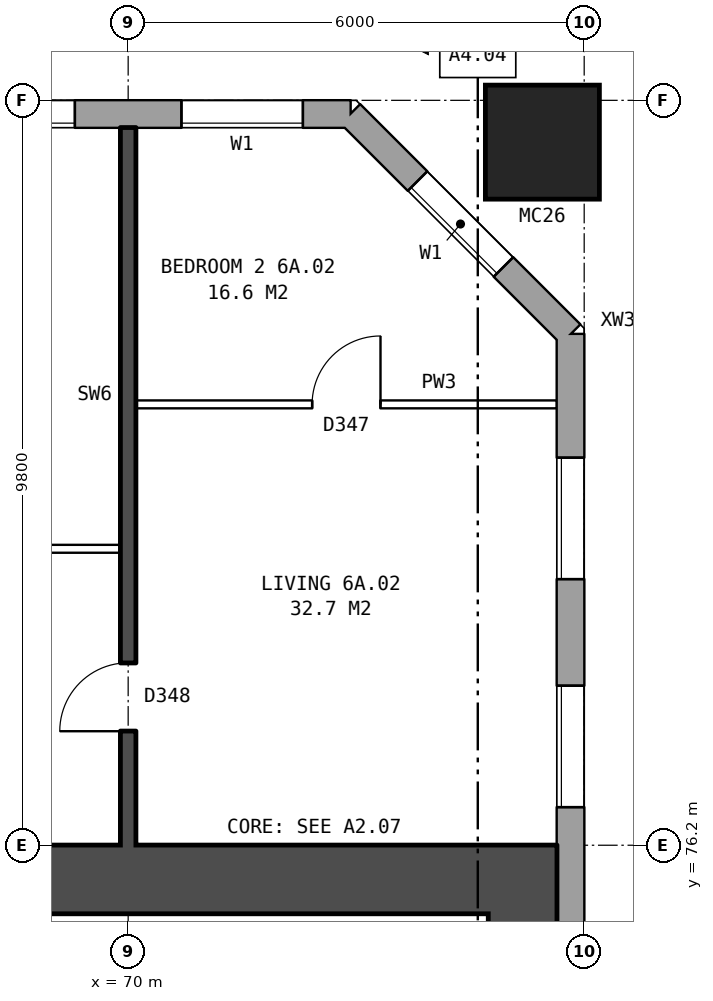
"""IFC4 building model, lengths in metres.
Left out: names, types, materials, properties, quantities, classifications, styles, units other than length and angle.
Written with IfcOpenShell. Run it as: python <this file> out.ifc"""

import sys

from ifc_helpers import new_model, si_unit, direction, frame, frame_2d, origin, origin_2d, place, context, subcontext, project, spatial, rectangle, hollow_rectangle, extrude, element, fill, save


model = new_model("IFC4")
c1 = context("Model", 3, precision=1e-05, world=origin(), true_north=direction((0.0, 1.0)))
c2 = subcontext(c1, "Body", "Model", "MODEL_VIEW")
j1 = project(units=[si_unit("LENGTHUNIT", "METRE"), si_unit("PLANEANGLEUNIT", "RADIAN")], contexts=[c1])
p1 = place(None, origin())
s1 = spatial("IfcSite", under=j1, at=p1, CompositionType="ELEMENT")
p2 = place(p1, origin())
s2 = spatial("IfcBuilding", under=s1, at=p2, CompositionType="ELEMENT")
p3 = place(p2, frame((0.0, 0.0, 25.7)))
s3 = spatial("IfcBuildingStorey", under=s2, at=p3, CompositionType="ELEMENT", Elevation=25.7)
p4 = place(p3, frame((75.45, 85.45, 0.0), z_axis=(0.0, 0.0, 1.0), x_axis=(1.0, 0.0, 0.0)))
e1 = element("IfcColumn", 1, at=p4, inside=s3, PredefinedType="COLUMN", context=c2, shape_type="SweptSolid", body=[
    extrude(hollow_rectangle(XDim=1.5, YDim=1.5, WallThickness=0.08, at=origin_2d()), origin(), (0.0, 0.0, 1.0), 3.1),
])
p5 = place(p3, frame((75.82, 57.075, 0.0), z_axis=(0.0, 0.0, 1.0), x_axis=(0.0, 1.0, 0.0)))
e2 = element("IfcWall", 2, at=p5, inside=s3, PredefinedType="STANDARD", context=c2, shape_type="SweptSolid", body=[
    extrude(rectangle(XDim=25.851, YDim=0.36, at=frame_2d((12.925, 0.0))), origin(), (0.0, 0.0, 1.0), 2.85),
])
p6 = place(p5, frame((1.625, 0.0, 0.8)))
e3 = element("IfcOpeningElement", 3, at=p6, cuts=e2, PredefinedType="OPENING", context=c2, shape_type="SweptSolid", body=[
    extrude(rectangle(XDim=1.6, YDim=1.8, at=frame_2d((0.8, 0.9))), frame((0.0, 0.19, 0.0), z_axis=(0.0, -1.0, 0.0), x_axis=(1.0, 0.0, 0.0)), (0.0, 0.0, 1.0), 0.38),
])
p7 = place(p5, frame((4.625, 0.0, 0.8)))
e4 = element("IfcOpeningElement", 4, at=p7, cuts=e2, PredefinedType="OPENING", context=c2, shape_type="SweptSolid", body=[
    extrude(rectangle(XDim=1.6, YDim=1.8, at=frame_2d((0.8, 0.9))), frame((0.0, 0.19, 0.0), z_axis=(0.0, -1.0, 0.0), x_axis=(1.0, 0.0, 0.0)), (0.0, 0.0, 1.0), 0.38),
])
p8 = place(p5, frame((19.625, 0.0, 0.8)))
e5 = element("IfcOpeningElement", 5, at=p8, cuts=e2, PredefinedType="OPENING", context=c2, shape_type="SweptSolid", body=[
    extrude(rectangle(XDim=1.6, YDim=1.8, at=frame_2d((0.8, 0.9))), frame((0.0, 0.19, 0.0), z_axis=(0.0, -1.0, 0.0), x_axis=(1.0, 0.0, 0.0)), (0.0, 0.0, 1.0), 0.38),
])
p9 = place(p5, frame((22.625, 0.0, 0.8)))
e6 = element("IfcOpeningElement", 6, at=p9, cuts=e2, PredefinedType="OPENING", context=c2, shape_type="SweptSolid", body=[
    extrude(rectangle(XDim=1.6, YDim=1.8, at=frame_2d((0.8, 0.9))), frame((0.0, 0.19, 0.0), z_axis=(0.0, -1.0, 0.0), x_axis=(1.0, 0.0, 0.0)), (0.0, 0.0, 1.0), 0.38),
])
p10 = place(p3, frame((75.82, 82.925, 0.0), z_axis=(0.0, 0.0, 1.0), x_axis=(-0.707106781187, 0.707106781187, 0.0)))
e7 = element("IfcWall", 7, at=p10, inside=s3, PredefinedType="STANDARD", context=c2, shape_type="SweptSolid", body=[
    extrude(rectangle(XDim=4.094, YDim=0.36, at=frame_2d((2.047, 0.0))), origin(), (0.0, 0.0, 1.0), 2.85),
])
p11 = place(p10, frame((1.247, 0.0, 0.8)))
e8 = element("IfcOpeningElement", 8, at=p11, cuts=e7, PredefinedType="OPENING", context=c2, shape_type="SweptSolid", body=[
    extrude(rectangle(XDim=1.6, YDim=1.8, at=frame_2d((0.8, 0.9))), frame((0.0, 0.19, 0.0), z_axis=(0.0, -1.0, 0.0), x_axis=(1.0, 0.0, 0.0)), (0.0, 0.0, 1.0), 0.38),
])
p12 = place(p3, frame((72.925, 85.82, 0.0), z_axis=(0.0, 0.0, 1.0), x_axis=(-1.0, 0.0, 0.0)))
e9 = element("IfcWall", 9, at=p12, inside=s3, PredefinedType="STANDARD", context=c2, shape_type="SweptSolid", body=[
    extrude(rectangle(XDim=50.101, YDim=0.36, at=frame_2d((25.05, 0.0))), origin(), (0.0, 0.0, 1.0), 2.85),
])
p13 = place(p12, frame((0.625, 0.0, 0.8)))
e10 = element("IfcOpeningElement", 10, at=p13, cuts=e9, PredefinedType="OPENING", context=c2, shape_type="SweptSolid", body=[
    extrude(rectangle(XDim=1.6, YDim=1.8, at=frame_2d((0.8, 0.9))), frame((0.0, 0.19, 0.0), z_axis=(0.0, -1.0, 0.0), x_axis=(1.0, 0.0, 0.0)), (0.0, 0.0, 1.0), 0.38),
])
p14 = place(p12, frame((3.625, 0.0, 0.8)))
e11 = element("IfcOpeningElement", 11, at=p14, cuts=e9, PredefinedType="OPENING", context=c2, shape_type="SweptSolid", body=[
    extrude(rectangle(XDim=1.6, YDim=1.8, at=frame_2d((0.8, 0.9))), frame((0.0, 0.19, 0.0), z_axis=(0.0, -1.0, 0.0), x_axis=(1.0, 0.0, 0.0)), (0.0, 0.0, 1.0), 0.38),
])
p15 = place(p12, frame((5.525, 0.0, 0.8)))
e12 = element("IfcOpeningElement", 12, at=p15, cuts=e9, PredefinedType="OPENING", context=c2, shape_type="SweptSolid", body=[
    extrude(rectangle(XDim=1.4, YDim=1.8, at=frame_2d((0.7, 0.9))), frame((0.0, 0.19, 0.0), z_axis=(0.0, -1.0, 0.0), x_axis=(1.0, 0.0, 0.0)), (0.0, 0.0, 1.0), 0.38),
])
p16 = place(p12, frame((9.175, 0.0, 0.15)))
e13 = element("IfcOpeningElement", 13, at=p16, cuts=e9, PredefinedType="OPENING", context=c2, shape_type="SweptSolid", body=[
    extrude(rectangle(XDim=1.0, YDim=0.9, at=frame_2d((0.5, 0.45))), frame((0.0, 0.19, 0.0), z_axis=(0.0, -1.0, 0.0), x_axis=(1.0, 0.0, 0.0)), (0.0, 0.0, 1.0), 0.38),
])
p17 = place(p12, frame((12.625, 0.0, 0.8)))
e14 = element("IfcOpeningElement", 14, at=p17, cuts=e9, PredefinedType="OPENING", context=c2, shape_type="SweptSolid", body=[
    extrude(rectangle(XDim=1.6, YDim=1.8, at=frame_2d((0.8, 0.9))), frame((0.0, 0.19, 0.0), z_axis=(0.0, -1.0, 0.0), x_axis=(1.0, 0.0, 0.0)), (0.0, 0.0, 1.0), 0.38),
])
p18 = place(p12, frame((15.625, 0.0, 0.8)))
e15 = element("IfcOpeningElement", 15, at=p18, cuts=e9, PredefinedType="OPENING", context=c2, shape_type="SweptSolid", body=[
    extrude(rectangle(XDim=1.6, YDim=1.8, at=frame_2d((0.8, 0.9))), frame((0.0, 0.19, 0.0), z_axis=(0.0, -1.0, 0.0), x_axis=(1.0, 0.0, 0.0)), (0.0, 0.0, 1.0), 0.38),
])
p19 = place(p12, frame((18.625, 0.0, 0.8)))
e16 = element("IfcOpeningElement", 16, at=p19, cuts=e9, PredefinedType="OPENING", context=c2, shape_type="SweptSolid", body=[
    extrude(rectangle(XDim=1.6, YDim=1.8, at=frame_2d((0.8, 0.9))), frame((0.0, 0.19, 0.0), z_axis=(0.0, -1.0, 0.0), x_axis=(1.0, 0.0, 0.0)), (0.0, 0.0, 1.0), 0.38),
])
p20 = place(p12, frame((21.625, 0.0, 0.8)))
e17 = element("IfcOpeningElement", 17, at=p20, cuts=e9, PredefinedType="OPENING", context=c2, shape_type="SweptSolid", body=[
    extrude(rectangle(XDim=1.6, YDim=1.8, at=frame_2d((0.8, 0.9))), frame((0.0, 0.19, 0.0), z_axis=(0.0, -1.0, 0.0), x_axis=(1.0, 0.0, 0.0)), (0.0, 0.0, 1.0), 0.38),
])
p21 = place(p12, frame((24.625, 0.0, 0.8)))
e18 = element("IfcOpeningElement", 18, at=p21, cuts=e9, PredefinedType="OPENING", context=c2, shape_type="SweptSolid", body=[
    extrude(rectangle(XDim=1.6, YDim=1.8, at=frame_2d((0.8, 0.9))), frame((0.0, 0.19, 0.0), z_axis=(0.0, -1.0, 0.0), x_axis=(1.0, 0.0, 0.0)), (0.0, 0.0, 1.0), 0.38),
])
p22 = place(p12, frame((27.625, 0.0, 0.8)))
e19 = element("IfcOpeningElement", 19, at=p22, cuts=e9, PredefinedType="OPENING", context=c2, shape_type="SweptSolid", body=[
    extrude(rectangle(XDim=1.6, YDim=1.8, at=frame_2d((0.8, 0.9))), frame((0.0, 0.19, 0.0), z_axis=(0.0, -1.0, 0.0), x_axis=(1.0, 0.0, 0.0)), (0.0, 0.0, 1.0), 0.38),
])
p23 = place(p12, frame((30.625, 0.0, 0.8)))
e20 = element("IfcOpeningElement", 20, at=p23, cuts=e9, PredefinedType="OPENING", context=c2, shape_type="SweptSolid", body=[
    extrude(rectangle(XDim=1.6, YDim=1.8, at=frame_2d((0.8, 0.9))), frame((0.0, 0.19, 0.0), z_axis=(0.0, -1.0, 0.0), x_axis=(1.0, 0.0, 0.0)), (0.0, 0.0, 1.0), 0.38),
])
p24 = place(p12, frame((33.625, 0.0, 0.8)))
e21 = element("IfcOpeningElement", 21, at=p24, cuts=e9, PredefinedType="OPENING", context=c2, shape_type="SweptSolid", body=[
    extrude(rectangle(XDim=1.6, YDim=1.8, at=frame_2d((0.8, 0.9))), frame((0.0, 0.19, 0.0), z_axis=(0.0, -1.0, 0.0), x_axis=(1.0, 0.0, 0.0)), (0.0, 0.0, 1.0), 0.38),
])
p25 = place(p12, frame((36.625, 0.0, 0.8)))
e22 = element("IfcOpeningElement", 22, at=p25, cuts=e9, PredefinedType="OPENING", context=c2, shape_type="SweptSolid", body=[
    extrude(rectangle(XDim=1.6, YDim=1.8, at=frame_2d((0.8, 0.9))), frame((0.0, 0.19, 0.0), z_axis=(0.0, -1.0, 0.0), x_axis=(1.0, 0.0, 0.0)), (0.0, 0.0, 1.0), 0.38),
])
p26 = place(p12, frame((39.125, 0.0, 0.8)))
e23 = element("IfcOpeningElement", 23, at=p26, cuts=e9, PredefinedType="OPENING", context=c2, shape_type="SweptSolid", body=[
    extrude(rectangle(XDim=0.8, YDim=0.9, at=frame_2d((0.4, 0.45))), frame((0.0, 0.19, 0.0), z_axis=(0.0, -1.0, 0.0), x_axis=(1.0, 0.0, 0.0)), (0.0, 0.0, 1.0), 0.38),
])
p27 = place(p12, frame((42.625, 0.0, 0.8)))
e24 = element("IfcOpeningElement", 24, at=p27, cuts=e9, PredefinedType="OPENING", context=c2, shape_type="SweptSolid", body=[
    extrude(rectangle(XDim=1.6, YDim=1.8, at=frame_2d((0.8, 0.9))), frame((0.0, 0.19, 0.0), z_axis=(0.0, -1.0, 0.0), x_axis=(1.0, 0.0, 0.0)), (0.0, 0.0, 1.0), 0.38),
])
p28 = place(p12, frame((45.625, 0.0, 0.8)))
e25 = element("IfcOpeningElement", 25, at=p28, cuts=e9, PredefinedType="OPENING", context=c2, shape_type="SweptSolid", body=[
    extrude(rectangle(XDim=1.6, YDim=1.8, at=frame_2d((0.8, 0.9))), frame((0.0, 0.19, 0.0), z_axis=(0.0, -1.0, 0.0), x_axis=(1.0, 0.0, 0.0)), (0.0, 0.0, 1.0), 0.38),
])
p29 = place(p12, frame((7.225, 0.0, 1.4)))
e26 = element("IfcOpeningElement", 26, at=p29, cuts=e9, PredefinedType="OPENING", context=c2, shape_type="SweptSolid", body=[
    extrude(rectangle(XDim=1.0, YDim=1.2, at=frame_2d((0.5, 0.6))), frame((0.0, 0.19, 0.0), z_axis=(0.0, -1.0, 0.0), x_axis=(1.0, 0.0, 0.0)), (0.0, 0.0, 1.0), 0.38),
])
p30 = place(p12, frame((10.525, 0.0, 0.15)))
e27 = element("IfcOpeningElement", 27, at=p30, cuts=e9, PredefinedType="OPENING", context=c2, shape_type="SweptSolid", body=[
    extrude(rectangle(XDim=1.2, YDim=1.8, at=frame_2d((0.6, 0.9))), frame((0.0, 0.19, 0.0), z_axis=(0.0, -1.0, 0.0), x_axis=(1.0, 0.0, 0.0)), (0.0, 0.0, 1.0), 0.38),
])
p31 = place(p12, frame((41.375, 0.0, 1.7)))
e28 = element("IfcOpeningElement", 28, at=p31, cuts=e9, PredefinedType="OPENING", context=c2, shape_type="SweptSolid", body=[
    extrude(rectangle(XDim=0.8, YDim=0.9, at=frame_2d((0.4, 0.45))), frame((0.0, 0.19, 0.0), z_axis=(0.0, -1.0, 0.0), x_axis=(1.0, 0.0, 0.0)), (0.0, 0.0, 1.0), 0.38),
])
p32 = place(p3, frame((75.19, 64.7, 0.0), z_axis=(0.0, 0.0, 1.0), x_axis=(0.0, 1.0, 0.0)))
e29 = element("IfcWall", 29, at=p32, inside=s3, PredefinedType="SHEAR", context=c2, shape_type="SweptSolid", body=[
    extrude(rectangle(XDim=10.6, YDim=0.9, at=frame_2d((5.3, 0.0))), origin(), (0.0, 0.0, 1.0), 2.85),
])
p33 = place(p3, frame((66.64, 75.75, 0.0), z_axis=(0.0, 0.0, 1.0), x_axis=(1.0, 0.0, 0.0)))
e30 = element("IfcWall", 30, at=p33, inside=s3, PredefinedType="SHEAR", context=c2, shape_type="SweptSolid", body=[
    extrude(rectangle(XDim=9.0, YDim=0.9, at=frame_2d((4.5, 0.0))), origin(), (0.0, 0.0, 1.0), 2.85),
])
p34 = place(p3, frame((64.1, 80.1, 0.0), z_axis=(0.0, 0.0, 1.0), x_axis=(1.0, 0.0, 0.0)))
e31 = element("IfcWall", 31, at=p34, inside=s3, PredefinedType="PARTITIONING", context=c2, shape_type="SweptSolid", body=[
    extrude(rectangle(XDim=5.8, YDim=0.1, at=frame_2d((2.9, 0.0))), origin(), (0.0, 0.0, 1.0), 2.85),
])
p35 = place(p34, frame((3.6, 0.0, 0.0)))
e32 = element("IfcOpeningElement", 32, at=p35, cuts=e31, PredefinedType="OPENING", context=c2, shape_type="SweptSolid", body=[
    extrude(rectangle(XDim=0.9, YDim=2.1, at=frame_2d((0.45, 1.05))), frame((0.0, 0.06, 0.0), z_axis=(0.0, -1.0, 0.0), x_axis=(1.0, 0.0, 0.0)), (0.0, 0.0, 1.0), 0.12),
])
p36 = place(p34, frame((0.7, 0.0, 0.0)))
e33 = element("IfcOpeningElement", 33, at=p36, cuts=e31, PredefinedType="OPENING", context=c2, shape_type="SweptSolid", body=[
    extrude(rectangle(XDim=0.9, YDim=2.1, at=frame_2d((0.45, 1.05))), frame((0.0, 0.06, 0.0), z_axis=(0.0, -1.0, 0.0), x_axis=(1.0, 0.0, 0.0)), (0.0, 0.0, 1.0), 0.12),
])
p37 = place(p3, frame((70.1, 82.0, 0.0), z_axis=(0.0, 0.0, 1.0), x_axis=(1.0, 0.0, 0.0)))
e34 = element("IfcWall", 34, at=p37, inside=s3, PredefinedType="PARTITIONING", context=c2, shape_type="SweptSolid", body=[
    extrude(rectangle(XDim=5.54, YDim=0.1, at=frame_2d((2.77, 0.0))), origin(), (0.0, 0.0, 1.0), 2.85),
])
p38 = place(p37, frame((2.32, 0.0, 0.0)))
e35 = element("IfcOpeningElement", 35, at=p38, cuts=e34, PredefinedType="OPENING", context=c2, shape_type="SweptSolid", body=[
    extrude(rectangle(XDim=0.9, YDim=2.1, at=frame_2d((0.45, 1.05))), frame((0.0, 0.06, 0.0), z_axis=(0.0, -1.0, 0.0), x_axis=(1.0, 0.0, 0.0)), (0.0, 0.0, 1.0), 0.12),
])
p39 = place(p3, frame((70.0, 76.2, 0.0), z_axis=(0.0, 0.0, 1.0), x_axis=(0.0, 1.0, 0.0)))
e36 = element("IfcWall", 36, at=p39, inside=s3, PredefinedType="SOLIDWALL", context=c2, shape_type="SweptSolid", body=[
    extrude(rectangle(XDim=9.44, YDim=0.2, at=frame_2d((4.72, 0.0))), origin(), (0.0, 0.0, 1.0), 2.85),
])
p40 = place(p39, frame((1.5, 0.0, 0.0)))
e37 = element("IfcOpeningElement", 37, at=p40, cuts=e36, PredefinedType="OPENING", context=c2, shape_type="SweptSolid", body=[
    extrude(rectangle(XDim=0.9, YDim=2.1, at=frame_2d((0.45, 1.05))), frame((0.0, 0.11, 0.0), z_axis=(0.0, -1.0, 0.0), x_axis=(1.0, 0.0, 0.0)), (0.0, 0.0, 1.0), 0.22),
])
p41 = place(p8, origin())
e38 = element("IfcWindow", 38, at=p41, inside=s3, PartitioningType="SINGLE_PANEL", PredefinedType="WINDOW", context=c2, shape_type="SweptSolid", body=[
    extrude(rectangle(XDim=1.6, YDim=1.8, at=frame_2d((0.8, 0.9))), frame((0.0, 0.15, 0.0), z_axis=(0.0, -1.0, 0.0), x_axis=(1.0, 0.0, 0.0)), (0.0, 0.0, 1.0), 0.06),
])
fill(e5, e38)
p42 = place(p9, origin())
e39 = element("IfcWindow", 39, at=p42, inside=s3, PartitioningType="SINGLE_PANEL", PredefinedType="WINDOW", context=c2, shape_type="SweptSolid", body=[
    extrude(rectangle(XDim=1.6, YDim=1.8, at=frame_2d((0.8, 0.9))), frame((0.0, 0.15, 0.0), z_axis=(0.0, -1.0, 0.0), x_axis=(1.0, 0.0, 0.0)), (0.0, 0.0, 1.0), 0.06),
])
fill(e6, e39)
p43 = place(p11, origin())
e40 = element("IfcWindow", 40, at=p43, inside=s3, PartitioningType="SINGLE_PANEL", PredefinedType="WINDOW", context=c2, shape_type="SweptSolid", body=[
    extrude(rectangle(XDim=1.6, YDim=1.8, at=frame_2d((0.8, 0.9))), frame((0.0, 0.15, 0.0), z_axis=(0.0, -1.0, 0.0), x_axis=(1.0, 0.0, 0.0)), (0.0, 0.0, 1.0), 0.06),
])
fill(e8, e40)
p44 = place(p13, origin())
e41 = element("IfcWindow", 41, at=p44, inside=s3, PartitioningType="SINGLE_PANEL", PredefinedType="WINDOW", context=c2, shape_type="SweptSolid", body=[
    extrude(rectangle(XDim=1.6, YDim=1.8, at=frame_2d((0.8, 0.9))), frame((0.0, 0.15, 0.0), z_axis=(0.0, -1.0, 0.0), x_axis=(1.0, 0.0, 0.0)), (0.0, 0.0, 1.0), 0.06),
])
fill(e10, e41)
p45 = place(p14, origin())
e42 = element("IfcWindow", 42, at=p45, inside=s3, PartitioningType="SINGLE_PANEL", PredefinedType="WINDOW", context=c2, shape_type="SweptSolid", body=[
    extrude(rectangle(XDim=1.6, YDim=1.8, at=frame_2d((0.8, 0.9))), frame((0.0, 0.15, 0.0), z_axis=(0.0, -1.0, 0.0), x_axis=(1.0, 0.0, 0.0)), (0.0, 0.0, 1.0), 0.06),
])
fill(e11, e42)
p46 = place(p38, origin())
e43 = element("IfcDoor", 43, at=p46, inside=s3, OperationType="SINGLE_SWING_RIGHT", PredefinedType="DOOR", context=c2, shape_type="SweptSolid", body=[
    extrude(rectangle(XDim=0.9, YDim=2.1, at=frame_2d((0.45, 1.05))), frame((0.0, 0.025, 0.0), z_axis=(0.0, -1.0, 0.0), x_axis=(1.0, 0.0, 0.0)), (0.0, 0.0, 1.0), 0.05),
])
fill(e35, e43)
p47 = place(p40, origin())
e44 = element("IfcDoor", 44, at=p47, inside=s3, OperationType="SINGLE_SWING_LEFT", PredefinedType="DOOR", context=c2, shape_type="SweptSolid", body=[
    extrude(rectangle(XDim=0.9, YDim=2.1, at=frame_2d((0.45, 1.05))), frame((0.0, 0.025, 0.0), z_axis=(0.0, -1.0, 0.0), x_axis=(1.0, 0.0, 0.0)), (0.0, 0.0, 1.0), 0.05),
])
fill(e37, e44)
save(model, sys.argv[1])
